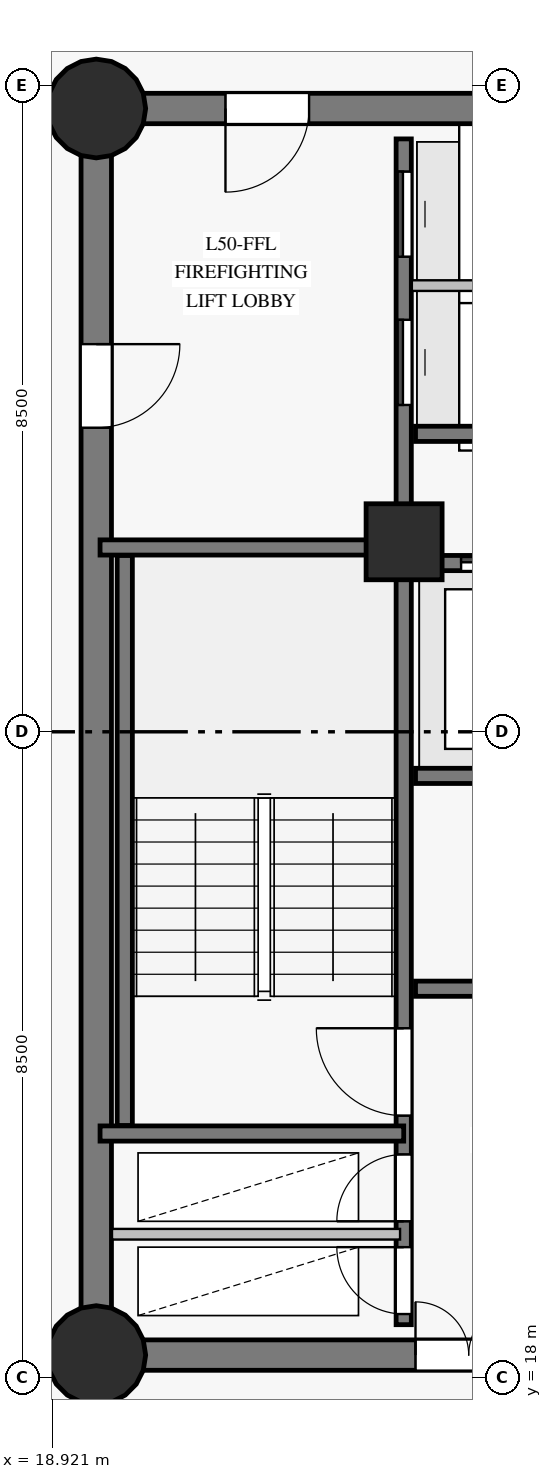
"""IFC4 building model, lengths in metres.
Left out: names, types, materials, properties, quantities, classifications, styles, units other than length and angle.
Written with IfcOpenShell. Run it as: python <this file> out.ifc"""

import sys

from ifc_helpers import new_model, si_unit, direction, frame, frame_2d, origin, origin_with_axes, origin_2d, place, context, subcontext, project, spatial, rectangle, circle, extrude, source, transform, mapped, element, fill, save


model = new_model("IFC4")
c1 = context("Model", 3, precision=1e-05, world=origin(), true_north=direction((0.0, 1.0)))
c2 = subcontext(c1, "Body", "Model", "MODEL_VIEW")
j1 = project(units=[si_unit("LENGTHUNIT", "METRE"), si_unit("PLANEANGLEUNIT", "RADIAN")], contexts=[c1])
p1 = place(None, origin())
s1 = spatial("IfcSite", under=j1, at=p1, CompositionType="ELEMENT")
p2 = place(p1, origin())
s2 = spatial("IfcBuilding", under=s1, at=p2, CompositionType="ELEMENT")
p3 = place(p2, frame((0.0, 0.0, 174.85)))
s3 = spatial("IfcBuildingStorey", under=s2, at=p3, CompositionType="ELEMENT", Elevation=174.85)
p4 = place(p3, frame((19.5, 18.3, 0.0), z_axis=(0.0, 0.0, 1.0), x_axis=(1.0, 0.0, 0.0)))
e1 = element("IfcWall", 1, at=p4, inside=s3, PredefinedType="SHEAR", context=c2, shape_type="SweptSolid", body=[
    extrude(rectangle(XDim=7.05, YDim=0.4, at=frame_2d((3.525, 0.0))), origin(), (0.0, 0.0, 1.0), 2.825),
])
p5 = place(p4, frame((4.2, 0.0, 0.0)))
e2 = element("IfcOpeningElement", 2, at=p5, cuts=e1, PredefinedType="OPENING", context=c2, shape_type="SweptSolid", body=[
    extrude(rectangle(XDim=1.4, YDim=2.2, at=frame_2d((0.7, 1.1))), frame((0.0, 0.21, 0.0), z_axis=(0.0, -1.0, 0.0), x_axis=(1.0, 0.0, 0.0)), (0.0, 0.0, 1.0), 0.42),
])
p6 = place(p3, frame((26.55, 34.7, 0.0), z_axis=(0.0, 0.0, 1.0), x_axis=(-1.0, 0.0, 0.0)))
e3 = element("IfcWall", 3, at=p6, inside=s3, PredefinedType="SHEAR", context=c2, shape_type="SweptSolid", body=[
    extrude(rectangle(XDim=7.05, YDim=0.4, at=frame_2d((3.525, 0.0))), origin(), (0.0, 0.0, 1.0), 2.825),
])
p7 = place(p6, frame((4.25, 0.0, 0.0)))
e4 = element("IfcOpeningElement", 4, at=p7, cuts=e3, PredefinedType="OPENING", context=c2, shape_type="SweptSolid", body=[
    extrude(rectangle(XDim=1.1, YDim=2.15, at=frame_2d((0.55, 1.075))), frame((0.0, 0.21, 0.0), z_axis=(0.0, -1.0, 0.0), x_axis=(1.0, 0.0, 0.0)), (0.0, 0.0, 1.0), 0.42),
])
p8 = place(p3, frame((19.5, 34.7, 0.0), z_axis=(0.0, 0.0, 1.0), x_axis=(0.0, -1.0, 0.0)))
e5 = element("IfcWall", 5, at=p8, inside=s3, PredefinedType="SHEAR", context=c2, shape_type="SweptSolid", body=[
    extrude(rectangle(XDim=16.4, YDim=0.4, at=frame_2d((8.2, 0.0))), origin(), (0.0, 0.0, 1.0), 2.825),
])
p9 = place(p8, frame((3.1, 0.0, 0.0)))
e6 = element("IfcOpeningElement", 6, at=p9, cuts=e5, PredefinedType="OPENING", context=c2, shape_type="SweptSolid", body=[
    extrude(rectangle(XDim=1.1, YDim=2.15, at=frame_2d((0.55, 1.075))), frame((0.0, 0.21, 0.0), z_axis=(0.0, -1.0, 0.0), x_axis=(1.0, 0.0, 0.0)), (0.0, 0.0, 1.0), 0.42),
])
m1 = source(origin_with_axes(), c2, "Body", "SweptSolid", [
    extrude(circle(Radius=0.65, at=origin_2d()), origin(), (0.0, 0.0, 1.0), 3.05),
])
for number, where, z_axis, x_axis in (
    (7, (19.5, 18.3, 0.0), (0.0, 0.0, 1.0), (1.0, 0.0, 0.0)),
    (8, (19.5, 34.7, 0.0), (0.0, 0.0, 1.0), (1.0, 0.0, 0.0)),
):
    element("IfcColumn", number, at=place(p3, frame(where, z_axis=z_axis, x_axis=x_axis)), inside=s3, PredefinedType="COLUMN", context=c2, shape_type="MappedRepresentation", body=[
        mapped(m1, transform((0.0, 0.0, 0.0), scale=1.0)),
    ])
m2 = source(origin_with_axes(), c2, "Body", "SweptSolid", [
    extrude(rectangle(XDim=1.0, YDim=1.0, at=origin_2d()), origin(), (0.0, 0.0, 1.0), 3.05),
])
p10 = place(p3, frame((23.55, 29.0, 0.0), z_axis=(0.0, 0.0, 1.0), x_axis=(1.0, 0.0, 0.0)))
e9 = element("IfcColumn", 9, at=p10, inside=s3, PredefinedType="COLUMN", context=c2, shape_type="MappedRepresentation", body=[
    mapped(m2, transform((0.0, 0.0, 0.0), scale=1.0)),
])
p11 = place(p3, frame((23.545, 18.7, 0.0), z_axis=(0.0, 0.0, 1.0), x_axis=(0.0, 1.0, 0.0)))
e10 = element("IfcWall", 10, at=p11, inside=s3, PredefinedType="SHEAR", context=c2, shape_type="SweptSolid", body=[
    extrude(rectangle(XDim=15.6, YDim=0.2, at=frame_2d((7.8, 0.0))), origin(), (0.0, 0.0, 1.0), 2.825),
])
p12 = place(p11, frame((2.75, 0.0, 0.0)))
e11 = element("IfcOpeningElement", 11, at=p12, cuts=e10, PredefinedType="OPENING", context=c2, shape_type="SweptSolid", body=[
    extrude(rectangle(XDim=1.15, YDim=2.15, at=frame_2d((0.575, 1.075))), frame((0.0, 0.11, 0.0), z_axis=(0.0, -1.0, 0.0), x_axis=(1.0, 0.0, 0.0)), (0.0, 0.0, 1.0), 0.22),
])
p13 = place(p11, frame((0.14, 0.0, 0.0)))
e12 = element("IfcOpeningElement", 12, at=p13, cuts=e10, PredefinedType="OPENING", context=c2, shape_type="SweptSolid", body=[
    extrude(rectangle(XDim=0.88, YDim=2.1, at=frame_2d((0.44, 1.05))), frame((0.0, 0.11, 0.0), z_axis=(0.0, -1.0, 0.0), x_axis=(1.0, 0.0, 0.0)), (0.0, 0.0, 1.0), 0.22),
])
p14 = place(p11, frame((1.36, 0.0, 0.0)))
e13 = element("IfcOpeningElement", 13, at=p14, cuts=e10, PredefinedType="OPENING", context=c2, shape_type="SweptSolid", body=[
    extrude(rectangle(XDim=0.88, YDim=2.1, at=frame_2d((0.44, 1.05))), frame((0.0, 0.11, 0.0), z_axis=(0.0, -1.0, 0.0), x_axis=(1.0, 0.0, 0.0)), (0.0, 0.0, 1.0), 0.22),
])
p15 = place(p11, frame((12.1, 0.0, 0.0)))
e14 = element("IfcOpeningElement", 14, at=p15, cuts=e10, PredefinedType="OPENING", context=c2, shape_type="SweptSolid", body=[
    extrude(rectangle(XDim=1.12, YDim=2.15, at=frame_2d((0.56, 1.075))), frame((0.0, 0.11, 0.0), z_axis=(0.0, -1.0, 0.0), x_axis=(1.0, 0.0, 0.0)), (0.0, 0.0, 1.0), 0.22),
])
p16 = place(p11, frame((14.05, 0.0, 0.0)))
e15 = element("IfcOpeningElement", 15, at=p16, cuts=e10, PredefinedType="OPENING", context=c2, shape_type="SweptSolid", body=[
    extrude(rectangle(XDim=1.12, YDim=2.15, at=frame_2d((0.56, 1.075))), frame((0.0, 0.11, 0.0), z_axis=(0.0, -1.0, 0.0), x_axis=(1.0, 0.0, 0.0)), (0.0, 0.0, 1.0), 0.22),
])
p17 = place(p3, frame((23.7, 23.12, 0.0), z_axis=(0.0, 0.0, 1.0), x_axis=(1.0, 0.0, 0.0)))
e16 = element("IfcWall", 16, at=p17, inside=s3, PredefinedType="SHEAR", context=c2, shape_type="SweptSolid", body=[
    extrude(rectangle(XDim=9.6, YDim=0.2, at=frame_2d((4.8, 0.0))), origin(), (0.0, 0.0, 1.0), 2.825),
])
p18 = place(p17, frame((1.1, 0.0, 0.0)))
e17 = element("IfcOpeningElement", 17, at=p18, cuts=e16, PredefinedType="OPENING", context=c2, shape_type="SweptSolid", body=[
    extrude(rectangle(XDim=0.92, YDim=2.1, at=frame_2d((0.46, 1.05))), frame((0.0, 0.11, 0.0), z_axis=(0.0, -1.0, 0.0), x_axis=(1.0, 0.0, 0.0)), (0.0, 0.0, 1.0), 0.22),
])
p19 = place(p17, frame((5.2, 0.0, 0.0)))
e18 = element("IfcOpeningElement", 18, at=p19, cuts=e16, PredefinedType="OPENING", context=c2, shape_type="SweptSolid", body=[
    extrude(rectangle(XDim=1.0, YDim=2.15, at=frame_2d((0.5, 1.075))), frame((0.0, 0.11, 0.0), z_axis=(0.0, -1.0, 0.0), x_axis=(1.0, 0.0, 0.0)), (0.0, 0.0, 1.0), 0.22),
])
p20 = place(p3, frame((23.7, 25.92, 0.0), z_axis=(0.0, 0.0, 1.0), x_axis=(1.0, 0.0, 0.0)))
e19 = element("IfcWall", 19, at=p20, inside=s3, PredefinedType="SHEAR", context=c2, shape_type="SweptSolid", body=[
    extrude(rectangle(XDim=9.6, YDim=0.2, at=frame_2d((4.8, 0.0))), origin(), (0.0, 0.0, 1.0), 2.825),
])
p21 = place(p3, frame((23.7, 28.72, 0.0), z_axis=(0.0, 0.0, 1.0), x_axis=(1.0, 0.0, 0.0)))
e20 = element("IfcWall", 20, at=p21, inside=s3, PredefinedType="SHEAR", context=c2, shape_type="SweptSolid", body=[
    extrude(rectangle(XDim=9.6, YDim=0.2, at=frame_2d((4.8, 0.0))), origin(), (0.0, 0.0, 1.0), 2.825),
])
p22 = place(p21, frame((0.6, 0.0, 0.0)))
e21 = element("IfcOpeningElement", 21, at=p22, cuts=e20, PredefinedType="OPENING", context=c2, shape_type="SweptSolid", body=[
    extrude(rectangle(XDim=1.1, YDim=2.15, at=frame_2d((0.55, 1.075))), frame((0.0, 0.11, 0.0), z_axis=(0.0, -1.0, 0.0), x_axis=(1.0, 0.0, 0.0)), (0.0, 0.0, 1.0), 0.22),
])
p23 = place(p21, frame((2.98, 0.0, 0.0)))
e22 = element("IfcOpeningElement", 22, at=p23, cuts=e20, PredefinedType="OPENING", context=c2, shape_type="SweptSolid", body=[
    extrude(rectangle(XDim=1.1, YDim=2.15, at=frame_2d((0.55, 1.075))), frame((0.0, 0.11, 0.0), z_axis=(0.0, -1.0, 0.0), x_axis=(1.0, 0.0, 0.0)), (0.0, 0.0, 1.0), 0.22),
])
p24 = place(p21, frame((5.36, 0.0, 0.0)))
e23 = element("IfcOpeningElement", 23, at=p24, cuts=e20, PredefinedType="OPENING", context=c2, shape_type="SweptSolid", body=[
    extrude(rectangle(XDim=1.1, YDim=2.15, at=frame_2d((0.55, 1.075))), frame((0.0, 0.11, 0.0), z_axis=(0.0, -1.0, 0.0), x_axis=(1.0, 0.0, 0.0)), (0.0, 0.0, 1.0), 0.22),
])
p25 = place(p21, frame((7.74, 0.0, 0.0)))
e24 = element("IfcOpeningElement", 24, at=p25, cuts=e20, PredefinedType="OPENING", context=c2, shape_type="SweptSolid", body=[
    extrude(rectangle(XDim=1.1, YDim=2.15, at=frame_2d((0.55, 1.075))), frame((0.0, 0.11, 0.0), z_axis=(0.0, -1.0, 0.0), x_axis=(1.0, 0.0, 0.0)), (0.0, 0.0, 1.0), 0.22),
])
p26 = place(p3, frame((19.875, 21.32, 0.0), z_axis=(0.0, 0.0, 1.0), x_axis=(0.0, 1.0, 0.0)))
e25 = element("IfcWall", 25, at=p26, inside=s3, PredefinedType="SHEAR", context=c2, shape_type="SweptSolid", body=[
    extrude(rectangle(XDim=7.5, YDim=0.2, at=frame_2d((3.75, 0.0))), origin(), (0.0, 0.0, 1.0), 2.825),
])
for number, where, z_axis, x_axis in (
    (26, (19.55, 21.215, 0.0), (0.0, 0.0, 1.0), (1.0, 0.0, 0.0)),
    (27, (19.55, 28.925, 0.0), (0.0, 0.0, 1.0), (1.0, 0.0, 0.0)),
):
    element("IfcWall", number, at=place(p3, frame(where, z_axis=z_axis, x_axis=x_axis)), inside=s3, PredefinedType="SHEAR", context=c2, shape_type="SweptSolid", body=[
        extrude(rectangle(XDim=3.995, YDim=0.2, at=frame_2d((1.998, 0.0))), origin(), (0.0, 0.0, 1.0), 2.825),
    ])
p27 = place(p3, frame((23.7, 30.42, 0.0), z_axis=(0.0, 0.0, 1.0), x_axis=(1.0, 0.0, 0.0)))
e28 = element("IfcWall", 28, at=p27, inside=s3, PredefinedType="SHEAR", context=c2, shape_type="SweptSolid", body=[
    extrude(rectangle(XDim=2.78, YDim=0.2, at=frame_2d((1.39, 0.0))), origin(), (0.0, 0.0, 1.0), 2.825),
])
p28 = place(p3, frame((19.707, 19.89, 0.0), z_axis=(0.0, 0.0, 1.0), x_axis=(1.0, 0.0, 0.0)))
e29 = element("IfcWall", 29, at=p28, inside=s3, PredefinedType="PARTITIONING", context=c2, shape_type="SweptSolid", body=[
    extrude(rectangle(XDim=3.79, YDim=0.14, at=frame_2d((1.895, 0.0))), origin(), (0.0, 0.0, 1.0), 2.825),
])
p29 = place(p3, frame((23.652, 32.37, 0.0), z_axis=(0.0, 0.0, 1.0), x_axis=(1.0, 0.0, 0.0)))
e30 = element("IfcWall", 30, at=p29, inside=s3, PredefinedType="PARTITIONING", context=c2, shape_type="SweptSolid", body=[
    extrude(rectangle(XDim=2.828, YDim=0.14, at=frame_2d((1.414, 0.0))), origin(), (0.0, 0.0, 1.0), 2.825),
])
m3 = source(origin_with_axes(), c2, "Body", "SweptSolid", [
    extrude(rectangle(XDim=1.15, YDim=2.15, at=frame_2d((0.575, 1.075))), frame((0.0, 0.025, 0.0), z_axis=(0.0, -1.0, 0.0), x_axis=(1.0, 0.0, 0.0)), (0.0, 0.0, 1.0), 0.05),
])
p30 = place(p12, origin())
e31 = element("IfcDoor", 31, at=p30, inside=s3, OperationType="SINGLE_SWING_RIGHT", PredefinedType="DOOR", context=c2, shape_type="MappedRepresentation", body=[
    mapped(m3, transform((0.0, 0.0, 0.0), scale=1.0)),
])
fill(e11, e31)
m4 = source(origin_with_axes(), c2, "Body", "SweptSolid", [
    extrude(rectangle(XDim=1.1, YDim=2.15, at=frame_2d((0.55, 1.075))), frame((0.0, 0.025, 0.0), z_axis=(0.0, -1.0, 0.0), x_axis=(1.0, 0.0, 0.0)), (0.0, 0.0, 1.0), 0.05),
])
p31 = place(p7, origin())
e32 = element("IfcDoor", 32, at=p31, inside=s3, OperationType="SINGLE_SWING_RIGHT", PredefinedType="DOOR", context=c2, shape_type="MappedRepresentation", body=[
    mapped(m4, transform((0.0, 0.0, 0.0), scale=1.0)),
])
fill(e4, e32)
p32 = place(p9, origin())
e33 = element("IfcDoor", 33, at=p32, inside=s3, OperationType="SINGLE_SWING_LEFT", PredefinedType="DOOR", context=c2, shape_type="MappedRepresentation", body=[
    mapped(m4, transform((0.0, 0.0, 0.0), scale=1.0)),
])
fill(e6, e33)
m5 = source(origin_with_axes(), c2, "Body", "SweptSolid", [
    extrude(rectangle(XDim=0.88, YDim=2.1, at=frame_2d((0.44, 1.05))), frame((0.0, 0.025, 0.0), z_axis=(0.0, -1.0, 0.0), x_axis=(1.0, 0.0, 0.0)), (0.0, 0.0, 1.0), 0.05),
])
p33 = place(p13, origin())
e34 = element("IfcDoor", 34, at=p33, inside=s3, OperationType="SINGLE_SWING_RIGHT", PredefinedType="DOOR", context=c2, shape_type="MappedRepresentation", body=[
    mapped(m5, transform((0.0, 0.0, 0.0), scale=1.0)),
])
fill(e12, e34)
p34 = place(p14, origin())
e35 = element("IfcDoor", 35, at=p34, inside=s3, OperationType="SINGLE_SWING_LEFT", PredefinedType="DOOR", context=c2, shape_type="MappedRepresentation", body=[
    mapped(m5, transform((0.0, 0.0, 0.0), scale=1.0)),
])
fill(e13, e35)
m6 = source(origin_with_axes(), c2, "Body", "SweptSolid", [
    extrude(rectangle(XDim=1.4, YDim=2.2, at=frame_2d((0.7, 1.1))), frame((0.0, 0.025, 0.0), z_axis=(0.0, -1.0, 0.0), x_axis=(1.0, 0.0, 0.0)), (0.0, 0.0, 1.0), 0.05),
])
p35 = place(p5, origin())
e36 = element("IfcDoor", 36, at=p35, inside=s3, OperationType="DOUBLE_DOOR_SINGLE_SWING", PredefinedType="DOOR", context=c2, shape_type="MappedRepresentation", body=[
    mapped(m6, transform((0.0, 0.0, 0.0), scale=1.0)),
])
fill(e2, e36)
p36 = place(p22, origin())
e37 = element("IfcDoor", 37, at=p36, inside=s3, OperationType="SLIDING_TO_LEFT", PredefinedType="DOOR", context=c2, shape_type="MappedRepresentation", body=[
    mapped(m4, transform((0.0, 0.0, 0.0), scale=1.0)),
])
fill(e21, e37)
m7 = source(origin_with_axes(), c2, "Body", "SweptSolid", [
    extrude(rectangle(XDim=1.12, YDim=2.15, at=frame_2d((0.56, 1.075))), frame((0.0, 0.025, 0.0), z_axis=(0.0, -1.0, 0.0), x_axis=(1.0, 0.0, 0.0)), (0.0, 0.0, 1.0), 0.05),
])
p37 = place(p15, origin())
e38 = element("IfcDoor", 38, at=p37, inside=s3, OperationType="SLIDING_TO_LEFT", PredefinedType="DOOR", context=c2, shape_type="MappedRepresentation", body=[
    mapped(m7, transform((0.0, 0.0, 0.0), scale=1.0)),
])
fill(e14, e38)
p38 = place(p16, origin())
e39 = element("IfcDoor", 39, at=p38, inside=s3, OperationType="SLIDING_TO_RIGHT", PredefinedType="DOOR", context=c2, shape_type="MappedRepresentation", body=[
    mapped(m7, transform((0.0, 0.0, 0.0), scale=1.0)),
])
fill(e15, e39)
save(model, sys.argv[1])
